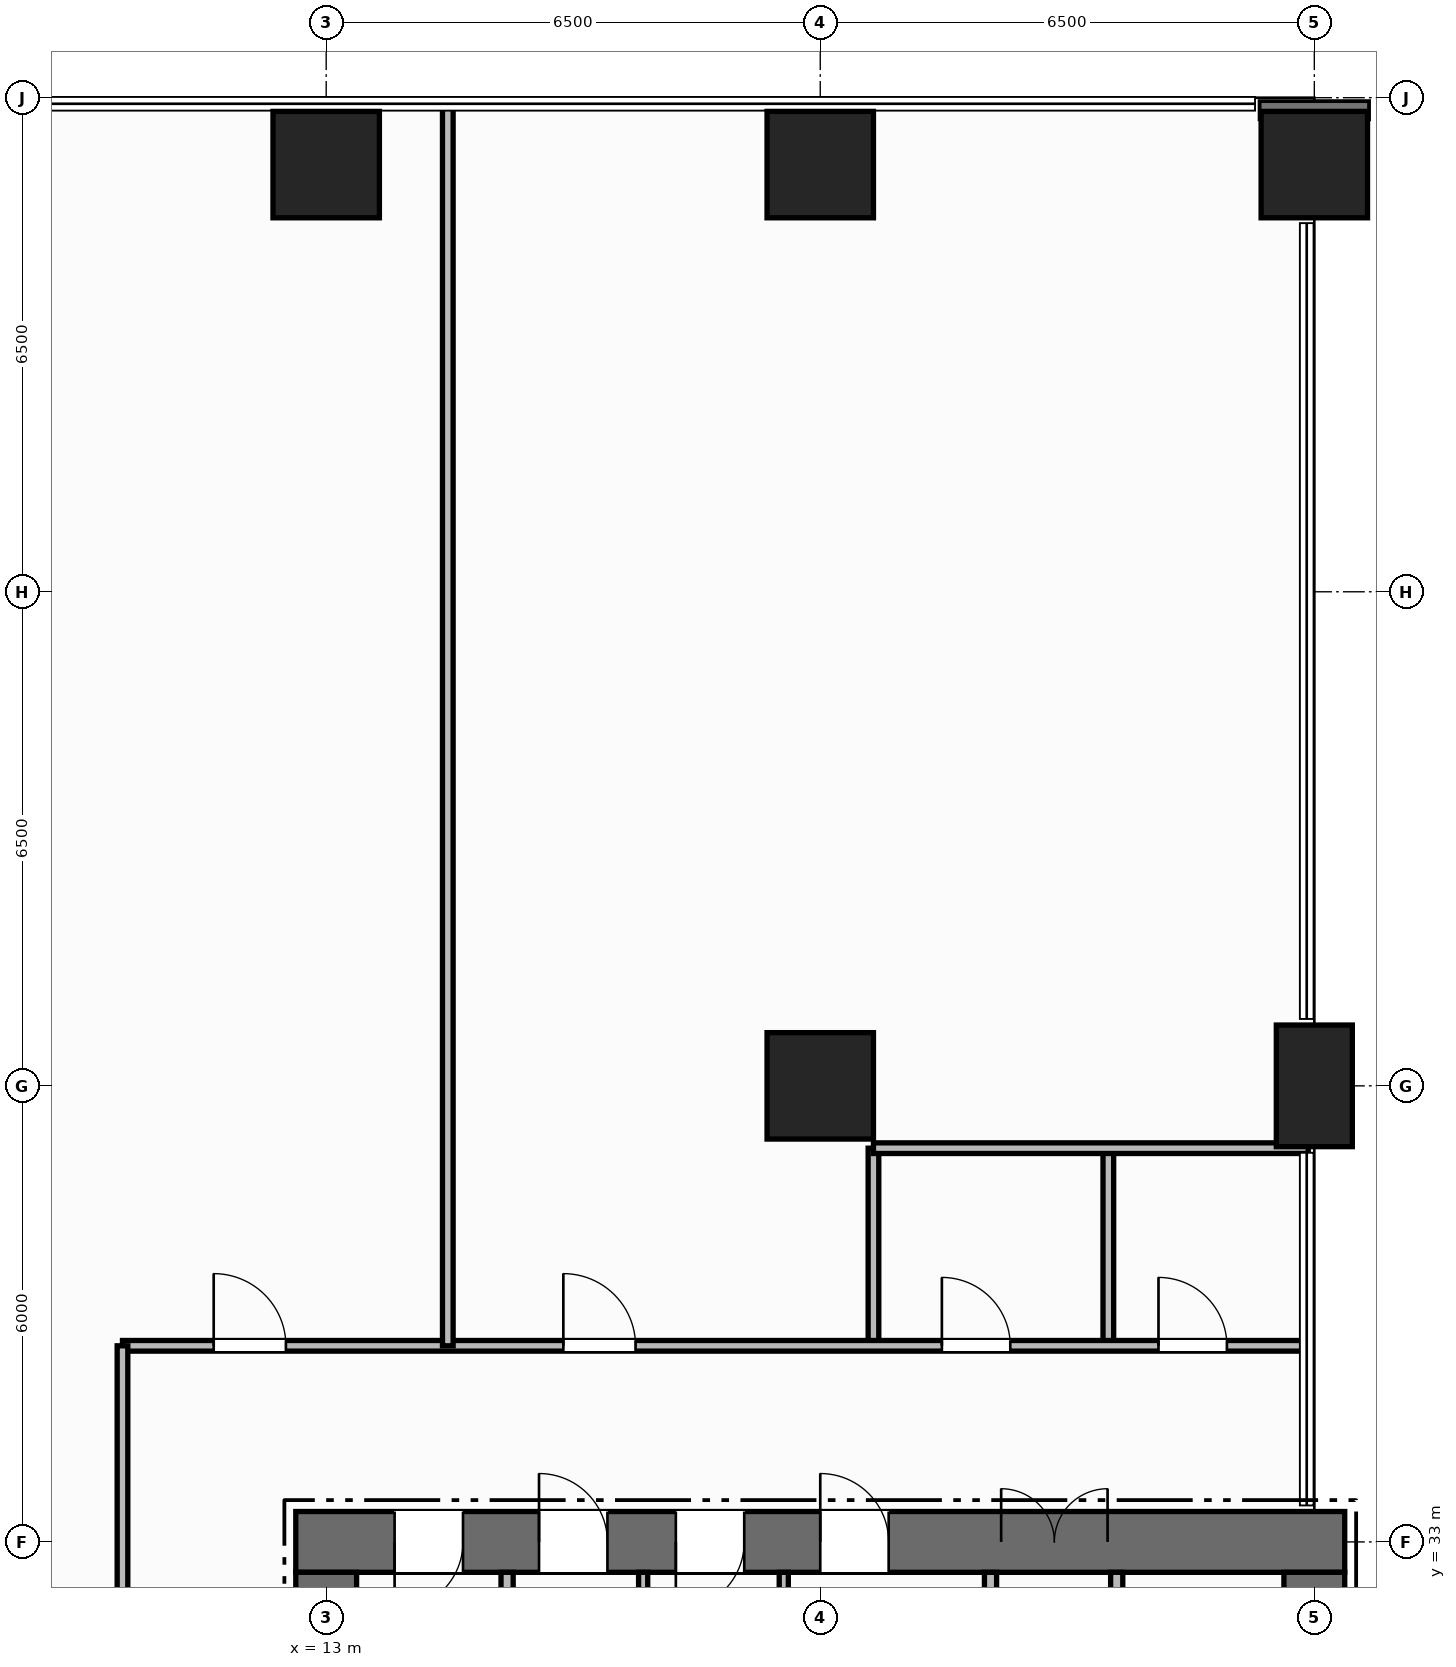
"""IFC4 building model, lengths in metres.
Left out: names, types, materials, properties, quantities, classifications, styles, units other than length and angle.
Written with IfcOpenShell. Run it as: python <this file> out.ifc"""

import sys

from ifc_helpers import new_model, si_unit, direction, frame, frame_2d, origin, origin_2d, place, context, subcontext, project, spatial, rectangle, extrude, element, fill, save


model = new_model("IFC4")
c1 = context("Model", 3, precision=1e-05, world=origin(), true_north=direction((0.0, 1.0)))
c2 = subcontext(c1, "Body", "Model", "MODEL_VIEW")
j1 = project(units=[si_unit("LENGTHUNIT", "METRE"), si_unit("PLANEANGLEUNIT", "RADIAN")], contexts=[c1])
p1 = place(None, origin())
s1 = spatial("IfcSite", under=j1, at=p1, CompositionType="ELEMENT")
p2 = place(p1, origin())
s2 = spatial("IfcBuilding", under=s1, at=p2, CompositionType="ELEMENT")
p3 = place(p2, frame((0.0, 0.0, 11.5)))
s3 = spatial("IfcBuildingStorey", under=s2, at=p3, CompositionType="ELEMENT", Elevation=11.5)
p4 = place(p3, frame((12.6, 33.0, 0.0), z_axis=(0.0, 0.0, 1.0), x_axis=(1.0, 0.0, 0.0)))
e1 = element("IfcWall", 1, at=p4, inside=s3, PredefinedType="SHEAR", context=c2, shape_type="SweptSolid", body=[
    extrude(rectangle(XDim=13.8, YDim=0.8, at=frame_2d((6.9, 0.0))), origin(), (0.0, 0.0, 1.0), 5.5),
])
p5 = place(p4, frame((1.3, 0.0, 0.0)))
e2 = element("IfcOpeningElement", 2, at=p5, cuts=e1, PredefinedType="OPENING", context=c2, shape_type="SweptSolid", body=[
    extrude(rectangle(XDim=0.9, YDim=2.15, at=frame_2d((0.45, 1.075))), frame((0.0, 0.41, 0.0), z_axis=(0.0, -1.0, 0.0), x_axis=(1.0, 0.0, 0.0)), (0.0, 0.0, 1.0), 0.82),
])
p6 = place(p4, frame((3.2, 0.0, 0.0)))
e3 = element("IfcOpeningElement", 3, at=p6, cuts=e1, PredefinedType="OPENING", context=c2, shape_type="SweptSolid", body=[
    extrude(rectangle(XDim=0.9, YDim=2.15, at=frame_2d((0.45, 1.075))), frame((0.0, 0.41, 0.0), z_axis=(0.0, -1.0, 0.0), x_axis=(1.0, 0.0, 0.0)), (0.0, 0.0, 1.0), 0.82),
])
p7 = place(p4, frame((5.0, 0.0, 0.0)))
e4 = element("IfcOpeningElement", 4, at=p7, cuts=e1, PredefinedType="OPENING", context=c2, shape_type="SweptSolid", body=[
    extrude(rectangle(XDim=0.9, YDim=2.15, at=frame_2d((0.45, 1.075))), frame((0.0, 0.41, 0.0), z_axis=(0.0, -1.0, 0.0), x_axis=(1.0, 0.0, 0.0)), (0.0, 0.0, 1.0), 0.82),
])
p8 = place(p4, frame((6.9, 0.0, 0.0)))
e5 = element("IfcOpeningElement", 5, at=p8, cuts=e1, PredefinedType="OPENING", context=c2, shape_type="SweptSolid", body=[
    extrude(rectangle(XDim=0.9, YDim=2.15, at=frame_2d((0.45, 1.075))), frame((0.0, 0.41, 0.0), z_axis=(0.0, -1.0, 0.0), x_axis=(1.0, 0.0, 0.0)), (0.0, 0.0, 1.0), 0.82),
])
p9 = place(p4, frame((9.28, 0.0, 0.0)))
e6 = element("IfcOpeningElement", 6, at=p9, cuts=e1, PredefinedType="OPENING", context=c2, shape_type="SweptSolid", body=[
    extrude(rectangle(XDim=1.4, YDim=2.2, at=frame_2d((0.7, 1.1))), frame((0.0, 0.41, 0.0), z_axis=(0.0, -1.0, 0.0), x_axis=(1.0, 0.0, 0.0)), (0.0, 0.0, 1.0), 0.82),
])
p10 = place(p3, frame((13.0, 19.4, 0.0), z_axis=(0.0, 0.0, 1.0), x_axis=(0.0, 1.0, 0.0)))
e7 = element("IfcWall", 7, at=p10, inside=s3, PredefinedType="SHEAR", context=c2, shape_type="SweptSolid", body=[
    extrude(rectangle(XDim=13.2, YDim=0.8, at=frame_2d((6.6, 0.0))), origin(), (0.0, 0.0, 1.0), 5.5),
])
p11 = place(p10, frame((4.65, 0.0, 0.0)))
e8 = element("IfcOpeningElement", 8, at=p11, cuts=e7, PredefinedType="OPENING", context=c2, shape_type="SweptSolid", body=[
    extrude(rectangle(XDim=1.4, YDim=2.2, at=frame_2d((0.7, 1.1))), frame((0.0, 0.41, 0.0), z_axis=(0.0, -1.0, 0.0), x_axis=(1.0, 0.0, 0.0)), (0.0, 0.0, 1.0), 0.82),
])
p12 = place(p3, frame((26.0, 19.4, 0.0), z_axis=(0.0, 0.0, 1.0), x_axis=(0.0, 1.0, 0.0)))
e9 = element("IfcWall", 9, at=p12, inside=s3, PredefinedType="SHEAR", context=c2, shape_type="SweptSolid", body=[
    extrude(rectangle(XDim=13.2, YDim=0.8, at=frame_2d((6.6, 0.0))), origin(), (0.0, 0.0, 1.0), 5.5),
])
p13 = place(p3, frame((19.5, 39.0, 0.0), z_axis=(0.0, 0.0, 1.0), x_axis=(1.0, 0.0, 0.0)))
e10 = element("IfcColumn", 10, at=p13, inside=s3, PredefinedType="COLUMN", context=c2, shape_type="SweptSolid", body=[
    extrude(rectangle(XDim=1.4, YDim=1.4, at=origin_2d()), origin(), (0.0, 0.0, 1.0), 5.5),
])
p14 = place(p3, frame((26.0, 39.0, 0.0), z_axis=(0.0, 0.0, 1.0), x_axis=(1.0, 0.0, 0.0)))
e11 = element("IfcColumn", 11, at=p14, inside=s3, PredefinedType="PILASTER", context=c2, shape_type="SweptSolid", body=[
    extrude(rectangle(XDim=1.0, YDim=1.6, at=origin_2d()), origin(), (0.0, 0.0, 1.0), 5.5),
])
for number, where, z_axis, x_axis in (
    (12, (13.0, 51.12, 0.0), (0.0, 0.0, 1.0), (1.0, 0.0, 0.0)),
    (13, (19.5, 51.12, 0.0), (0.0, 0.0, 1.0), (1.0, 0.0, 0.0)),
    (14, (26.0, 51.12, 0.0), (0.0, 0.0, 1.0), (1.0, 0.0, 0.0)),
):
    element("IfcColumn", number, at=place(p3, frame(where, z_axis=z_axis, x_axis=x_axis)), inside=s3, PredefinedType="COLUMN", context=c2, shape_type="SweptSolid", body=[
        extrude(rectangle(XDim=1.4, YDim=1.4, at=origin_2d()), origin(), (0.0, 0.0, 1.0), 5.5),
    ])
p15 = place(p3, frame((15.38, 26.56, 0.0), z_axis=(0.0, 0.0, 1.0), x_axis=(0.0, 1.0, 0.0)))
e15 = element("IfcWall", 15, at=p15, inside=s3, PredefinedType="STANDARD", context=c2, shape_type="SweptSolid", body=[
    extrude(rectangle(XDim=6.04, YDim=0.16, at=frame_2d((3.02, 0.0))), origin(), (0.0, 0.0, 1.0), 5.22),
])
for number, where, z_axis, x_axis in (
    (16, (17.17, 26.56, 0.0), (0.0, 0.0, 1.0), (0.0, 1.0, 0.0)),
    (17, (19.02, 26.56, 0.0), (0.0, 0.0, 1.0), (0.0, 1.0, 0.0)),
):
    element("IfcWall", number, at=place(p3, frame(where, z_axis=z_axis, x_axis=x_axis)), inside=s3, PredefinedType="PARTITIONING", context=c2, shape_type="SweptSolid", body=[
        extrude(rectangle(XDim=6.04, YDim=0.12, at=frame_2d((3.02, 0.0))), origin(), (0.0, 0.0, 1.0), 5.22),
    ])
p16 = place(p3, frame((21.74, 26.56, 0.0), z_axis=(0.0, 0.0, 1.0), x_axis=(0.0, 1.0, 0.0)))
e18 = element("IfcWall", 18, at=p16, inside=s3, PredefinedType="STANDARD", context=c2, shape_type="SweptSolid", body=[
    extrude(rectangle(XDim=6.04, YDim=0.16, at=frame_2d((3.02, 0.0))), origin(), (0.0, 0.0, 1.0), 5.22),
])
p17 = place(p3, frame((23.4, 19.4, 0.0), z_axis=(0.0, 0.0, 1.0), x_axis=(0.0, 1.0, 0.0)))
e19 = element("IfcWall", 19, at=p17, inside=s3, PredefinedType="STANDARD", context=c2, shape_type="SweptSolid", body=[
    extrude(rectangle(XDim=13.2, YDim=0.16, at=frame_2d((6.6, 0.0))), origin(), (0.0, 0.0, 1.0), 5.22),
])
p18 = place(p17, frame((0.55, 0.0, 0.0)))
e20 = element("IfcOpeningElement", 20, at=p18, cuts=e19, PredefinedType="OPENING", context=c2, shape_type="SweptSolid", body=[
    extrude(rectangle(XDim=1.1, YDim=2.2, at=frame_2d((0.55, 1.1))), frame((0.0, 0.09, 0.0), z_axis=(0.0, -1.0, 0.0), x_axis=(1.0, 0.0, 0.0)), (0.0, 0.0, 1.0), 0.18),
])
p19 = place(p17, frame((2.7, 0.0, 0.0)))
e21 = element("IfcOpeningElement", 21, at=p19, cuts=e19, PredefinedType="OPENING", context=c2, shape_type="SweptSolid", body=[
    extrude(rectangle(XDim=1.1, YDim=2.2, at=frame_2d((0.55, 1.1))), frame((0.0, 0.09, 0.0), z_axis=(0.0, -1.0, 0.0), x_axis=(1.0, 0.0, 0.0)), (0.0, 0.0, 1.0), 0.18),
])
for number, where, z_axis, x_axis in (
    (22, (20.2, 35.58, 0.0), (0.0, 0.0, 1.0), (0.0, 1.0, 0.0)),
    (23, (23.29, 35.58, 0.0), (0.0, 0.0, 1.0), (0.0, 1.0, 0.0)),
):
    element("IfcWall", number, at=place(p3, frame(where, z_axis=z_axis, x_axis=x_axis)), inside=s3, PredefinedType="PARTITIONING", context=c2, shape_type="SweptSolid", body=[
        extrude(rectangle(XDim=2.6, YDim=0.14, at=frame_2d((1.3, 0.0))), origin(), (0.0, 0.0, 1.0), 5.22),
    ])
p20 = place(p3, frame((20.2, 38.18, 0.0), z_axis=(0.0, 0.0, 1.0), x_axis=(1.0, 0.0, 0.0)))
e24 = element("IfcWall", 24, at=p20, inside=s3, PredefinedType="PARTITIONING", context=c2, shape_type="SweptSolid", body=[
    extrude(rectangle(XDim=5.72, YDim=0.14, at=frame_2d((2.86, 0.0))), origin(), (0.0, 0.0, 1.0), 5.22),
])
p21 = place(p3, frame((10.32, 35.58, 0.0), z_axis=(0.0, 0.0, 1.0), x_axis=(1.0, 0.0, 0.0)))
e25 = element("IfcWall", 25, at=p21, inside=s3, PredefinedType="PARTITIONING", context=c2, shape_type="SweptSolid", body=[
    extrude(rectangle(XDim=15.6, YDim=0.14, at=frame_2d((7.8, 0.0))), origin(), (0.0, 0.0, 1.0), 5.22),
])
p22 = place(p21, frame((10.78, 0.0, 0.0)))
e26 = element("IfcOpeningElement", 26, at=p22, cuts=e25, PredefinedType="OPENING", context=c2, shape_type="SweptSolid", body=[
    extrude(rectangle(XDim=0.9, YDim=2.15, at=frame_2d((0.45, 1.075))), frame((0.0, 0.08, 0.0), z_axis=(0.0, -1.0, 0.0), x_axis=(1.0, 0.0, 0.0)), (0.0, 0.0, 1.0), 0.16),
])
p23 = place(p21, frame((13.63, 0.0, 0.0)))
e27 = element("IfcOpeningElement", 27, at=p23, cuts=e25, PredefinedType="OPENING", context=c2, shape_type="SweptSolid", body=[
    extrude(rectangle(XDim=0.9, YDim=2.15, at=frame_2d((0.45, 1.075))), frame((0.0, 0.08, 0.0), z_axis=(0.0, -1.0, 0.0), x_axis=(1.0, 0.0, 0.0)), (0.0, 0.0, 1.0), 0.16),
])
p24 = place(p21, frame((1.2, 0.0, 0.0)))
e28 = element("IfcOpeningElement", 28, at=p24, cuts=e25, PredefinedType="OPENING", context=c2, shape_type="SweptSolid", body=[
    extrude(rectangle(XDim=0.95, YDim=2.15, at=frame_2d((0.475, 1.075))), frame((0.0, 0.08, 0.0), z_axis=(0.0, -1.0, 0.0), x_axis=(1.0, 0.0, 0.0)), (0.0, 0.0, 1.0), 0.16),
])
p25 = place(p21, frame((5.8, 0.0, 0.0)))
e29 = element("IfcOpeningElement", 29, at=p25, cuts=e25, PredefinedType="OPENING", context=c2, shape_type="SweptSolid", body=[
    extrude(rectangle(XDim=0.95, YDim=2.15, at=frame_2d((0.475, 1.075))), frame((0.0, 0.08, 0.0), z_axis=(0.0, -1.0, 0.0), x_axis=(1.0, 0.0, 0.0)), (0.0, 0.0, 1.0), 0.16),
])
p26 = place(p3, frame((14.6, 35.58, 0.0), z_axis=(0.0, 0.0, 1.0), x_axis=(0.0, 1.0, 0.0)))
e30 = element("IfcWall", 30, at=p26, inside=s3, PredefinedType="PARTITIONING", context=c2, shape_type="SweptSolid", body=[
    extrude(rectangle(XDim=16.36, YDim=0.14, at=frame_2d((8.18, 0.0))), origin(), (0.0, 0.0, 1.0), 5.22),
])
p27 = place(p3, frame((10.32, 18.6, 0.0), z_axis=(0.0, 0.0, 1.0), x_axis=(0.0, 1.0, 0.0)))
e31 = element("IfcWall", 31, at=p27, inside=s3, PredefinedType="PARTITIONING", context=c2, shape_type="SweptSolid", body=[
    extrude(rectangle(XDim=16.98, YDim=0.14, at=frame_2d((8.49, 0.0))), origin(), (0.0, 0.0, 1.0), 5.22),
])
p28 = place(p27, frame((4.0, 0.0, 0.0)))
e32 = element("IfcOpeningElement", 32, at=p28, cuts=e31, PredefinedType="OPENING", context=c2, shape_type="SweptSolid", body=[
    extrude(rectangle(XDim=1.5, YDim=2.2, at=frame_2d((0.75, 1.1))), frame((0.0, 0.08, 0.0), z_axis=(0.0, -1.0, 0.0), x_axis=(1.0, 0.0, 0.0)), (0.0, 0.0, 1.0), 0.16),
])
p29 = place(p5, origin())
e33 = element("IfcDoor", 33, at=p29, inside=s3, OperationType="SINGLE_SWING_RIGHT", PredefinedType="DOOR", context=c2, shape_type="SweptSolid", body=[
    extrude(rectangle(XDim=0.9, YDim=2.15, at=frame_2d((0.45, 1.075))), frame((0.0, -0.075, 0.0), z_axis=(0.0, -1.0, 0.0), x_axis=(1.0, 0.0, 0.0)), (0.0, 0.0, 1.0), 0.05),
])
fill(e2, e33)
p30 = place(p6, origin())
e34 = element("IfcDoor", 34, at=p30, inside=s3, OperationType="SINGLE_SWING_LEFT", PredefinedType="DOOR", context=c2, shape_type="SweptSolid", body=[
    extrude(rectangle(XDim=0.9, YDim=2.15, at=frame_2d((0.45, 1.075))), frame((0.0, -0.075, 0.0), z_axis=(0.0, -1.0, 0.0), x_axis=(1.0, 0.0, 0.0)), (0.0, 0.0, 1.0), 0.05),
])
fill(e3, e34)
p31 = place(p7, origin())
e35 = element("IfcDoor", 35, at=p31, inside=s3, OperationType="SINGLE_SWING_RIGHT", PredefinedType="DOOR", context=c2, shape_type="SweptSolid", body=[
    extrude(rectangle(XDim=0.9, YDim=2.15, at=frame_2d((0.45, 1.075))), frame((0.0, -0.075, 0.0), z_axis=(0.0, -1.0, 0.0), x_axis=(1.0, 0.0, 0.0)), (0.0, 0.0, 1.0), 0.05),
])
fill(e4, e35)
p32 = place(p8, origin())
e36 = element("IfcDoor", 36, at=p32, inside=s3, OperationType="SINGLE_SWING_LEFT", PredefinedType="DOOR", context=c2, shape_type="SweptSolid", body=[
    extrude(rectangle(XDim=0.9, YDim=2.15, at=frame_2d((0.45, 1.075))), frame((0.0, -0.075, 0.0), z_axis=(0.0, -1.0, 0.0), x_axis=(1.0, 0.0, 0.0)), (0.0, 0.0, 1.0), 0.05),
])
fill(e5, e36)
p33 = place(p9, origin())
e37 = element("IfcDoor", 37, at=p33, inside=s3, OperationType="DOUBLE_DOOR_SINGLE_SWING", PredefinedType="DOOR", context=c2, shape_type="SweptSolid", body=[
    extrude(rectangle(XDim=1.4, YDim=2.2, at=frame_2d((0.7, 1.1))), frame((0.0, -0.075, 0.0), z_axis=(0.0, -1.0, 0.0), x_axis=(1.0, 0.0, 0.0)), (0.0, 0.0, 1.0), 0.05),
])
fill(e6, e37)
p34 = place(p22, origin())
e38 = element("IfcDoor", 38, at=p34, inside=s3, OperationType="SINGLE_SWING_LEFT", PredefinedType="DOOR", context=c2, shape_type="SweptSolid", body=[
    extrude(rectangle(XDim=0.9, YDim=2.15, at=frame_2d((0.45, 1.075))), frame((0.0, 0.025, 0.0), z_axis=(0.0, -1.0, 0.0), x_axis=(1.0, 0.0, 0.0)), (0.0, 0.0, 1.0), 0.05),
])
fill(e26, e38)
p35 = place(p23, origin())
e39 = element("IfcDoor", 39, at=p35, inside=s3, OperationType="SINGLE_SWING_LEFT", PredefinedType="DOOR", context=c2, shape_type="SweptSolid", body=[
    extrude(rectangle(XDim=0.9, YDim=2.15, at=frame_2d((0.45, 1.075))), frame((0.0, 0.025, 0.0), z_axis=(0.0, -1.0, 0.0), x_axis=(1.0, 0.0, 0.0)), (0.0, 0.0, 1.0), 0.05),
])
fill(e27, e39)
p36 = place(p24, origin())
e40 = element("IfcDoor", 40, at=p36, inside=s3, OperationType="SINGLE_SWING_LEFT", PredefinedType="DOOR", context=c2, shape_type="SweptSolid", body=[
    extrude(rectangle(XDim=0.95, YDim=2.15, at=frame_2d((0.475, 1.075))), frame((0.0, 0.025, 0.0), z_axis=(0.0, -1.0, 0.0), x_axis=(1.0, 0.0, 0.0)), (0.0, 0.0, 1.0), 0.05),
])
fill(e28, e40)
p37 = place(p25, origin())
e41 = element("IfcDoor", 41, at=p37, inside=s3, OperationType="SINGLE_SWING_LEFT", PredefinedType="DOOR", context=c2, shape_type="SweptSolid", body=[
    extrude(rectangle(XDim=0.95, YDim=2.15, at=frame_2d((0.475, 1.075))), frame((0.0, 0.025, 0.0), z_axis=(0.0, -1.0, 0.0), x_axis=(1.0, 0.0, 0.0)), (0.0, 0.0, 1.0), 0.05),
])
fill(e29, e41)
save(model, sys.argv[1])
